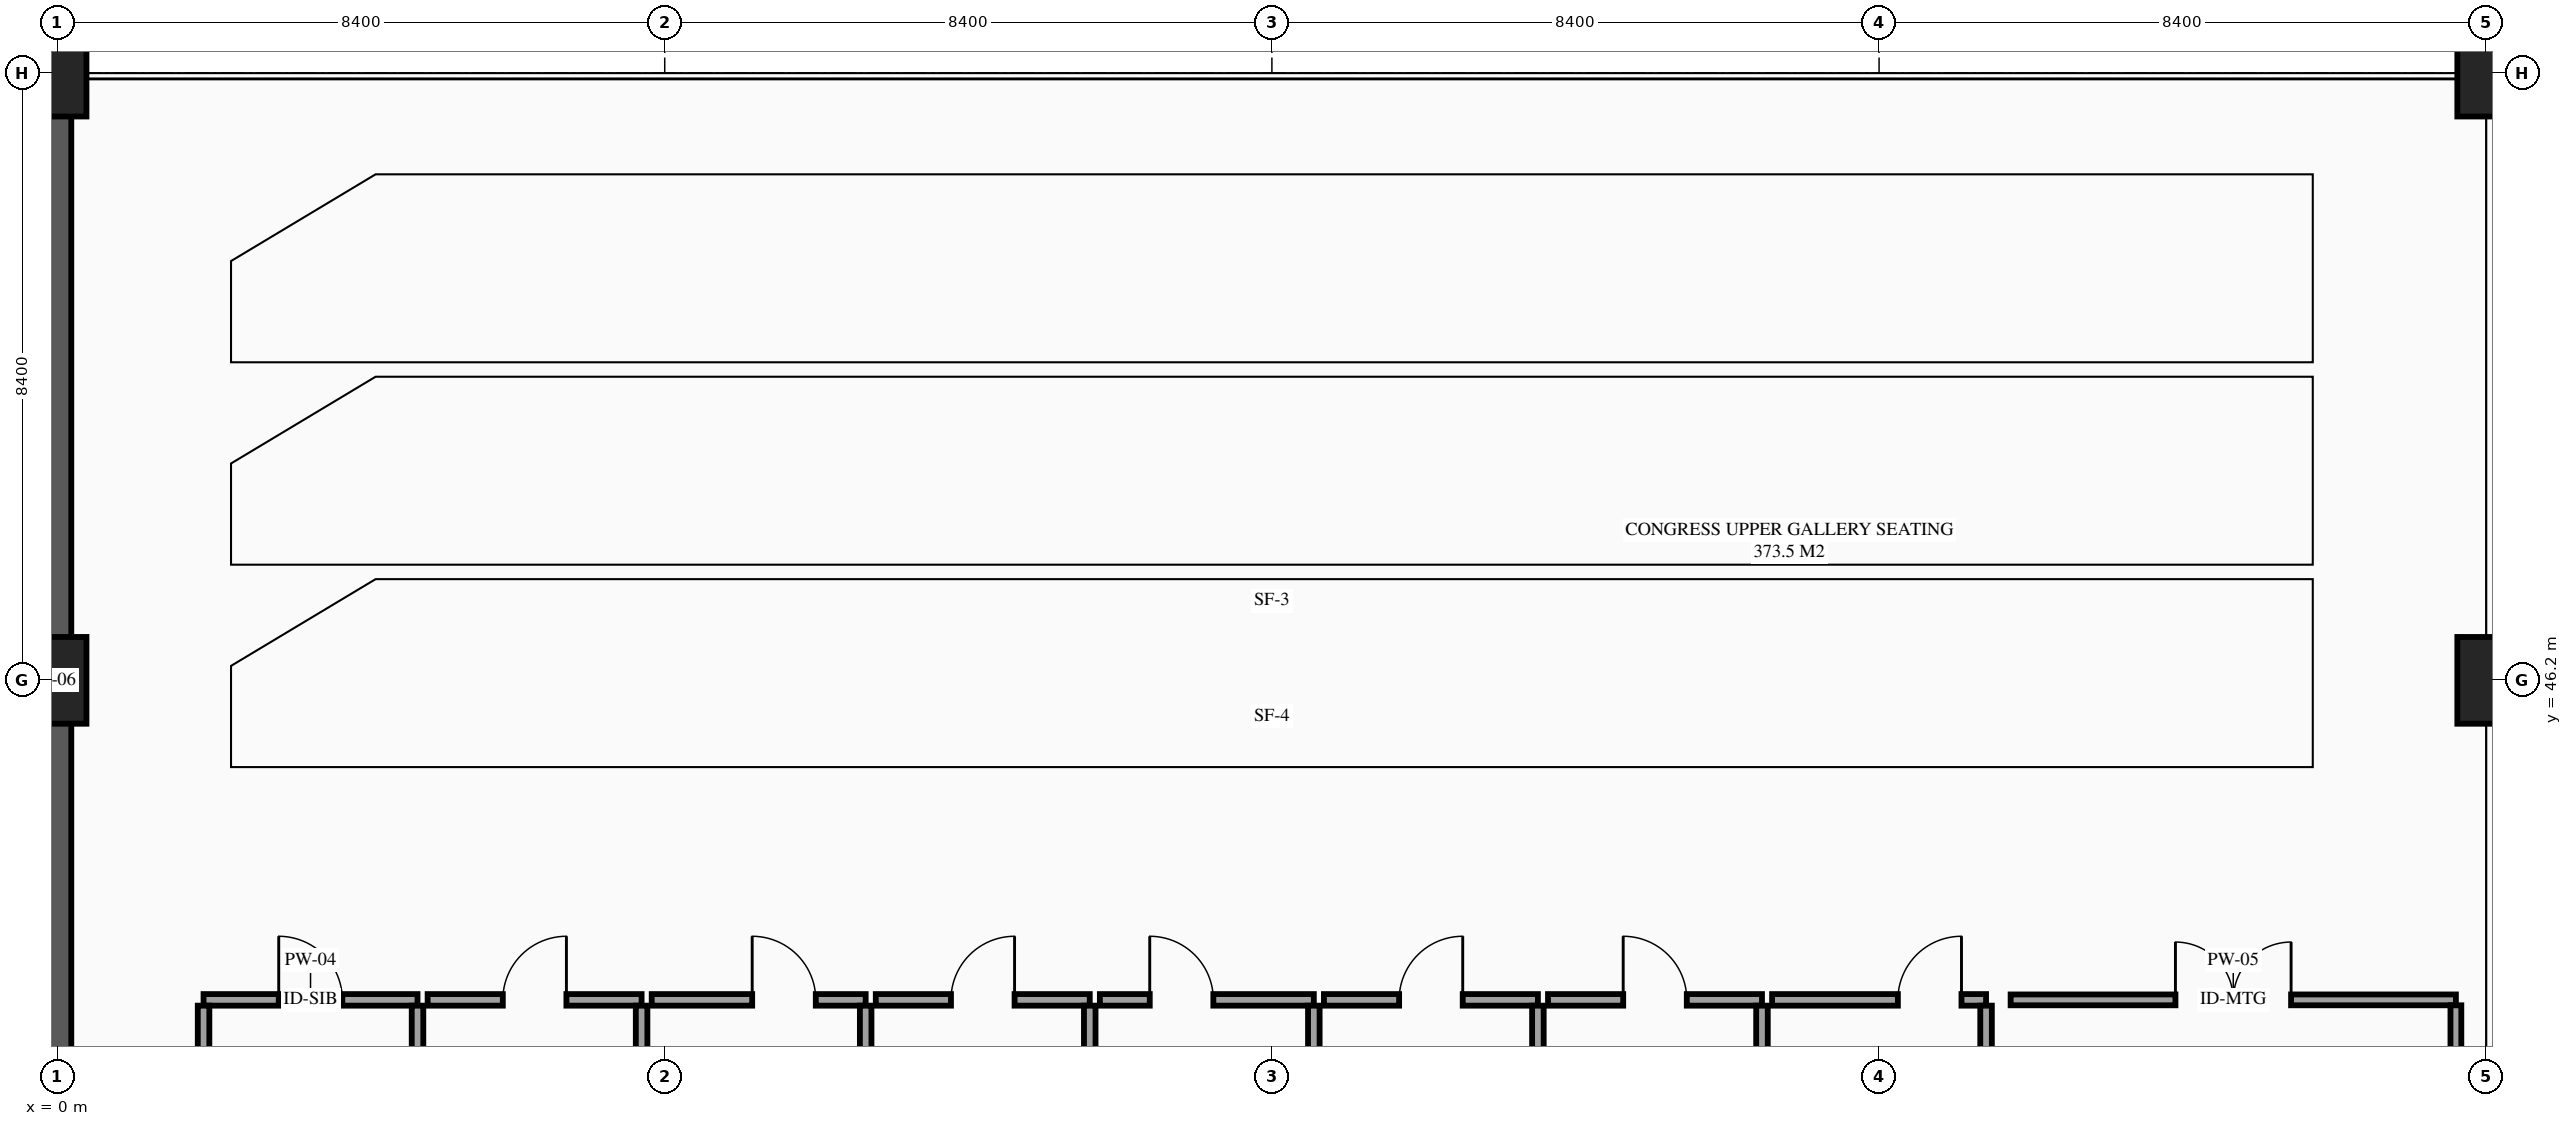
"""IFC4 building model, lengths in metres.
Left out: names, types, materials, properties, quantities, classifications, styles, units other than length and angle.
Written with IfcOpenShell. Run it as: python <this file> out.ifc"""

import sys

from ifc_helpers import new_model, si_unit, direction, frame, frame_2d, origin, origin_2d, place, context, subcontext, project, spatial, rectangle, extrude, element, fill, save


model = new_model("IFC4")
c1 = context("Model", 3, precision=1e-05, world=origin(), true_north=direction((0.0, 1.0)))
c2 = subcontext(c1, "Body", "Model", "MODEL_VIEW")
j1 = project(units=[si_unit("LENGTHUNIT", "METRE"), si_unit("PLANEANGLEUNIT", "RADIAN")], contexts=[c1])
p1 = place(None, origin())
s1 = spatial("IfcSite", under=j1, at=p1, CompositionType="ELEMENT")
p2 = place(p1, origin())
s2 = spatial("IfcBuilding", under=s1, at=p2, CompositionType="ELEMENT")
p3 = place(p2, frame((0.0, 0.0, 5.4)))
s3 = spatial("IfcBuildingStorey", under=s2, at=p3, CompositionType="ELEMENT", Elevation=5.4)
for number, where, z_axis, x_axis in (
    (1, (0.0, 46.2, 0.0), (0.0, 0.0, 1.0), (1.0, 0.0, 0.0)),
    (2, (0.0, 54.6, 0.0), (0.0, 0.0, 1.0), (1.0, 0.0, 0.0)),
    (3, (33.6, 46.2, 0.0), (0.0, 0.0, 1.0), (1.0, 0.0, 0.0)),
    (4, (33.6, 54.6, 0.0), (0.0, 0.0, 1.0), (1.0, 0.0, 0.0)),
):
    element("IfcColumn", number, at=place(p3, frame(where, z_axis=z_axis, x_axis=x_axis)), inside=s3, PredefinedType="COLUMN", context=c2, shape_type="SweptSolid", body=[
        extrude(rectangle(XDim=0.8, YDim=1.2, at=origin_2d()), origin(), (0.0, 0.0, 1.0), 4.5),
    ])
p4 = place(p3, frame((0.0, 63.0, 0.0), z_axis=(0.0, 0.0, 1.0), x_axis=(0.0, -1.0, 0.0)))
e5 = element("IfcWall", 5, at=p4, inside=s3, PredefinedType="STANDARD", context=c2, shape_type="SweptSolid", body=[
    extrude(rectangle(XDim=8.4, YDim=0.38, at=frame_2d((4.2, 0.0))), origin(), (0.0, 0.0, 1.0), 4.5),
])
p5 = place(p3, frame((0.0, 54.6, 0.0), z_axis=(0.0, 0.0, 1.0), x_axis=(0.0, -1.0, 0.0)))
e6 = element("IfcWall", 6, at=p5, inside=s3, PredefinedType="STANDARD", context=c2, shape_type="SweptSolid", body=[
    extrude(rectangle(XDim=8.4, YDim=0.38, at=frame_2d((4.2, 0.0))), origin(), (0.0, 0.0, 1.0), 4.5),
])
p6 = place(p3, frame((0.0, 46.2, 0.0), z_axis=(0.0, 0.0, 1.0), x_axis=(0.0, -1.0, 0.0)))
e7 = element("IfcWall", 7, at=p6, inside=s3, PredefinedType="STANDARD", context=c2, shape_type="SweptSolid", body=[
    extrude(rectangle(XDim=8.4, YDim=0.38, at=frame_2d((4.2, 0.0))), origin(), (0.0, 0.0, 1.0), 4.5),
])
p7 = place(p3, frame((2.02, 41.78, 0.0), z_axis=(0.0, 0.0, 1.0), x_axis=(1.0, 0.0, 0.0)))
e8 = element("IfcWall", 8, at=p7, inside=s3, PredefinedType="PARTITIONING", context=c2, shape_type="SweptSolid", body=[
    extrude(rectangle(XDim=2.96, YDim=0.16, at=frame_2d((1.48, 0.0))), origin(), (0.0, 0.0, 1.0), 4.235),
])
p8 = place(p7, frame((1.04, 0.0, 0.0)))
e9 = element("IfcOpeningElement", 9, at=p8, cuts=e8, PredefinedType="OPENING", context=c2, shape_type="SweptSolid", body=[
    extrude(rectangle(XDim=0.88, YDim=2.05, at=frame_2d((0.44, 1.025))), frame((0.0, 0.09, 0.0), z_axis=(0.0, -1.0, 0.0), x_axis=(1.0, 0.0, 0.0)), (0.0, 0.0, 1.0), 0.18),
])
for number, where, z_axis, x_axis in (
    (10, (2.02, 37.99, 0.0), (0.0, 0.0, 1.0), (0.0, 1.0, 0.0)),
    (11, (4.98, 37.99, 0.0), (0.0, 0.0, 1.0), (0.0, 1.0, 0.0)),
):
    element("IfcWall", number, at=place(p3, frame(where, z_axis=z_axis, x_axis=x_axis)), inside=s3, PredefinedType="PARTITIONING", context=c2, shape_type="SweptSolid", body=[
        extrude(rectangle(XDim=3.71, YDim=0.16, at=frame_2d((1.855, 0.0))), origin(), (0.0, 0.0, 1.0), 4.235),
    ])
p9 = place(p3, frame((5.12, 41.78, 0.0), z_axis=(0.0, 0.0, 1.0), x_axis=(1.0, 0.0, 0.0)))
e12 = element("IfcWall", 12, at=p9, inside=s3, PredefinedType="PARTITIONING", context=c2, shape_type="SweptSolid", body=[
    extrude(rectangle(XDim=2.96, YDim=0.16, at=frame_2d((1.48, 0.0))), origin(), (0.0, 0.0, 1.0), 4.235),
])
p10 = place(p9, frame((1.04, 0.0, 0.0)))
e13 = element("IfcOpeningElement", 13, at=p10, cuts=e12, PredefinedType="OPENING", context=c2, shape_type="SweptSolid", body=[
    extrude(rectangle(XDim=0.88, YDim=2.05, at=frame_2d((0.44, 1.025))), frame((0.0, 0.09, 0.0), z_axis=(0.0, -1.0, 0.0), x_axis=(1.0, 0.0, 0.0)), (0.0, 0.0, 1.0), 0.18),
])
p11 = place(p3, frame((8.08, 37.99, 0.0), z_axis=(0.0, 0.0, 1.0), x_axis=(0.0, 1.0, 0.0)))
e14 = element("IfcWall", 14, at=p11, inside=s3, PredefinedType="PARTITIONING", context=c2, shape_type="SweptSolid", body=[
    extrude(rectangle(XDim=3.71, YDim=0.16, at=frame_2d((1.855, 0.0))), origin(), (0.0, 0.0, 1.0), 4.235),
])
p12 = place(p3, frame((8.22, 41.78, 0.0), z_axis=(0.0, 0.0, 1.0), x_axis=(1.0, 0.0, 0.0)))
e15 = element("IfcWall", 15, at=p12, inside=s3, PredefinedType="PARTITIONING", context=c2, shape_type="SweptSolid", body=[
    extrude(rectangle(XDim=2.96, YDim=0.16, at=frame_2d((1.48, 0.0))), origin(), (0.0, 0.0, 1.0), 4.235),
])
p13 = place(p12, frame((1.39, 0.0, 0.0)))
e16 = element("IfcOpeningElement", 16, at=p13, cuts=e15, PredefinedType="OPENING", context=c2, shape_type="SweptSolid", body=[
    extrude(rectangle(XDim=0.88, YDim=2.05, at=frame_2d((0.44, 1.025))), frame((0.0, 0.09, 0.0), z_axis=(0.0, -1.0, 0.0), x_axis=(1.0, 0.0, 0.0)), (0.0, 0.0, 1.0), 0.18),
])
p14 = place(p3, frame((11.18, 37.99, 0.0), z_axis=(0.0, 0.0, 1.0), x_axis=(0.0, 1.0, 0.0)))
e17 = element("IfcWall", 17, at=p14, inside=s3, PredefinedType="PARTITIONING", context=c2, shape_type="SweptSolid", body=[
    extrude(rectangle(XDim=3.71, YDim=0.16, at=frame_2d((1.855, 0.0))), origin(), (0.0, 0.0, 1.0), 4.235),
])
p15 = place(p3, frame((11.32, 41.78, 0.0), z_axis=(0.0, 0.0, 1.0), x_axis=(1.0, 0.0, 0.0)))
e18 = element("IfcWall", 18, at=p15, inside=s3, PredefinedType="PARTITIONING", context=c2, shape_type="SweptSolid", body=[
    extrude(rectangle(XDim=2.96, YDim=0.16, at=frame_2d((1.48, 0.0))), origin(), (0.0, 0.0, 1.0), 4.235),
])
p16 = place(p15, frame((1.04, 0.0, 0.0)))
e19 = element("IfcOpeningElement", 19, at=p16, cuts=e18, PredefinedType="OPENING", context=c2, shape_type="SweptSolid", body=[
    extrude(rectangle(XDim=0.88, YDim=2.05, at=frame_2d((0.44, 1.025))), frame((0.0, 0.09, 0.0), z_axis=(0.0, -1.0, 0.0), x_axis=(1.0, 0.0, 0.0)), (0.0, 0.0, 1.0), 0.18),
])
p17 = place(p3, frame((14.28, 37.99, 0.0), z_axis=(0.0, 0.0, 1.0), x_axis=(0.0, 1.0, 0.0)))
e20 = element("IfcWall", 20, at=p17, inside=s3, PredefinedType="PARTITIONING", context=c2, shape_type="SweptSolid", body=[
    extrude(rectangle(XDim=3.71, YDim=0.16, at=frame_2d((1.855, 0.0))), origin(), (0.0, 0.0, 1.0), 4.235),
])
p18 = place(p3, frame((14.42, 41.78, 0.0), z_axis=(0.0, 0.0, 1.0), x_axis=(1.0, 0.0, 0.0)))
e21 = element("IfcWall", 21, at=p18, inside=s3, PredefinedType="PARTITIONING", context=c2, shape_type="SweptSolid", body=[
    extrude(rectangle(XDim=2.96, YDim=0.16, at=frame_2d((1.48, 0.0))), origin(), (0.0, 0.0, 1.0), 4.235),
])
p19 = place(p18, frame((0.69, 0.0, 0.0)))
e22 = element("IfcOpeningElement", 22, at=p19, cuts=e21, PredefinedType="OPENING", context=c2, shape_type="SweptSolid", body=[
    extrude(rectangle(XDim=0.88, YDim=2.05, at=frame_2d((0.44, 1.025))), frame((0.0, 0.09, 0.0), z_axis=(0.0, -1.0, 0.0), x_axis=(1.0, 0.0, 0.0)), (0.0, 0.0, 1.0), 0.18),
])
p20 = place(p3, frame((17.38, 38.82, 0.0), z_axis=(0.0, 0.0, 1.0), x_axis=(0.0, 1.0, 0.0)))
e23 = element("IfcWall", 23, at=p20, inside=s3, PredefinedType="PARTITIONING", context=c2, shape_type="SweptSolid", body=[
    extrude(rectangle(XDim=2.88, YDim=0.16, at=frame_2d((1.44, 0.0))), origin(), (0.0, 0.0, 1.0), 4.235),
])
p21 = place(p3, frame((17.52, 41.78, 0.0), z_axis=(0.0, 0.0, 1.0), x_axis=(1.0, 0.0, 0.0)))
e24 = element("IfcWall", 24, at=p21, inside=s3, PredefinedType="PARTITIONING", context=c2, shape_type="SweptSolid", body=[
    extrude(rectangle(XDim=2.96, YDim=0.16, at=frame_2d((1.48, 0.0))), origin(), (0.0, 0.0, 1.0), 4.235),
])
p22 = place(p21, frame((1.04, 0.0, 0.0)))
e25 = element("IfcOpeningElement", 25, at=p22, cuts=e24, PredefinedType="OPENING", context=c2, shape_type="SweptSolid", body=[
    extrude(rectangle(XDim=0.88, YDim=2.05, at=frame_2d((0.44, 1.025))), frame((0.0, 0.09, 0.0), z_axis=(0.0, -1.0, 0.0), x_axis=(1.0, 0.0, 0.0)), (0.0, 0.0, 1.0), 0.18),
])
p23 = place(p3, frame((20.48, 38.82, 0.0), z_axis=(0.0, 0.0, 1.0), x_axis=(0.0, 1.0, 0.0)))
e26 = element("IfcWall", 26, at=p23, inside=s3, PredefinedType="PARTITIONING", context=c2, shape_type="SweptSolid", body=[
    extrude(rectangle(XDim=2.88, YDim=0.16, at=frame_2d((1.44, 0.0))), origin(), (0.0, 0.0, 1.0), 4.235),
])
p24 = place(p3, frame((20.62, 41.78, 0.0), z_axis=(0.0, 0.0, 1.0), x_axis=(1.0, 0.0, 0.0)))
e27 = element("IfcWall", 27, at=p24, inside=s3, PredefinedType="PARTITIONING", context=c2, shape_type="SweptSolid", body=[
    extrude(rectangle(XDim=2.96, YDim=0.16, at=frame_2d((1.48, 0.0))), origin(), (0.0, 0.0, 1.0), 4.235),
])
p25 = place(p24, frame((1.04, 0.0, 0.0)))
e28 = element("IfcOpeningElement", 28, at=p25, cuts=e27, PredefinedType="OPENING", context=c2, shape_type="SweptSolid", body=[
    extrude(rectangle(XDim=0.88, YDim=2.05, at=frame_2d((0.44, 1.025))), frame((0.0, 0.09, 0.0), z_axis=(0.0, -1.0, 0.0), x_axis=(1.0, 0.0, 0.0)), (0.0, 0.0, 1.0), 0.18),
])
p26 = place(p3, frame((23.58, 38.82, 0.0), z_axis=(0.0, 0.0, 1.0), x_axis=(0.0, 1.0, 0.0)))
e29 = element("IfcWall", 29, at=p26, inside=s3, PredefinedType="PARTITIONING", context=c2, shape_type="SweptSolid", body=[
    extrude(rectangle(XDim=2.88, YDim=0.16, at=frame_2d((1.44, 0.0))), origin(), (0.0, 0.0, 1.0), 4.235),
])
p27 = place(p3, frame((23.72, 41.78, 0.0), z_axis=(0.0, 0.0, 1.0), x_axis=(1.0, 0.0, 0.0)))
e30 = element("IfcWall", 30, at=p27, inside=s3, PredefinedType="PARTITIONING", context=c2, shape_type="SweptSolid", body=[
    extrude(rectangle(XDim=2.96, YDim=0.16, at=frame_2d((1.48, 0.0))), origin(), (0.0, 0.0, 1.0), 4.235),
])
p28 = place(p27, frame((1.74, 0.0, 0.0)))
e31 = element("IfcOpeningElement", 31, at=p28, cuts=e30, PredefinedType="OPENING", context=c2, shape_type="SweptSolid", body=[
    extrude(rectangle(XDim=0.88, YDim=2.05, at=frame_2d((0.44, 1.025))), frame((0.0, 0.09, 0.0), z_axis=(0.0, -1.0, 0.0), x_axis=(1.0, 0.0, 0.0)), (0.0, 0.0, 1.0), 0.18),
])
p29 = place(p3, frame((26.68, 38.82, 0.0), z_axis=(0.0, 0.0, 1.0), x_axis=(0.0, 1.0, 0.0)))
e32 = element("IfcWall", 32, at=p29, inside=s3, PredefinedType="PARTITIONING", context=c2, shape_type="SweptSolid", body=[
    extrude(rectangle(XDim=2.88, YDim=0.16, at=frame_2d((1.44, 0.0))), origin(), (0.0, 0.0, 1.0), 4.235),
])
p30 = place(p3, frame((27.02, 41.78, 0.0), z_axis=(0.0, 0.0, 1.0), x_axis=(1.0, 0.0, 0.0)))
e33 = element("IfcWall", 33, at=p30, inside=s3, PredefinedType="PARTITIONING", context=c2, shape_type="SweptSolid", body=[
    extrude(rectangle(XDim=6.16, YDim=0.15, at=frame_2d((3.08, 0.0))), origin(), (0.0, 0.0, 1.0), 4.235),
])
p31 = place(p30, frame((2.28, 0.0, 0.0)))
e34 = element("IfcOpeningElement", 34, at=p31, cuts=e33, PredefinedType="OPENING", context=c2, shape_type="SweptSolid", body=[
    extrude(rectangle(XDim=1.6, YDim=2.25, at=frame_2d((0.8, 1.125))), frame((0.0, 0.085, 0.0), z_axis=(0.0, -1.0, 0.0), x_axis=(1.0, 0.0, 0.0)), (0.0, 0.0, 1.0), 0.17),
])
p32 = place(p3, frame((33.18, 38.82, 0.0), z_axis=(0.0, 0.0, 1.0), x_axis=(0.0, 1.0, 0.0)))
e35 = element("IfcWall", 35, at=p32, inside=s3, PredefinedType="PARTITIONING", context=c2, shape_type="SweptSolid", body=[
    extrude(rectangle(XDim=2.885, YDim=0.15, at=frame_2d((1.442, 0.0))), origin(), (0.0, 0.0, 1.0), 4.235),
])
p33 = place(p8, origin())
e36 = element("IfcDoor", 36, at=p33, inside=s3, OperationType="SINGLE_SWING_LEFT", PredefinedType="DOOR", context=c2, shape_type="SweptSolid", body=[
    extrude(rectangle(XDim=0.88, YDim=2.05, at=frame_2d((0.44, 1.025))), frame((0.0, 0.025, 0.0), z_axis=(0.0, -1.0, 0.0), x_axis=(1.0, 0.0, 0.0)), (0.0, 0.0, 1.0), 0.05),
])
fill(e9, e36)
p34 = place(p10, origin())
e37 = element("IfcDoor", 37, at=p34, inside=s3, OperationType="SINGLE_SWING_RIGHT", PredefinedType="DOOR", context=c2, shape_type="SweptSolid", body=[
    extrude(rectangle(XDim=0.88, YDim=2.05, at=frame_2d((0.44, 1.025))), frame((0.0, 0.025, 0.0), z_axis=(0.0, -1.0, 0.0), x_axis=(1.0, 0.0, 0.0)), (0.0, 0.0, 1.0), 0.05),
])
fill(e13, e37)
p35 = place(p13, origin())
e38 = element("IfcDoor", 38, at=p35, inside=s3, OperationType="SINGLE_SWING_LEFT", PredefinedType="DOOR", context=c2, shape_type="SweptSolid", body=[
    extrude(rectangle(XDim=0.88, YDim=2.05, at=frame_2d((0.44, 1.025))), frame((0.0, 0.025, 0.0), z_axis=(0.0, -1.0, 0.0), x_axis=(1.0, 0.0, 0.0)), (0.0, 0.0, 1.0), 0.05),
])
fill(e16, e38)
p36 = place(p16, origin())
e39 = element("IfcDoor", 39, at=p36, inside=s3, OperationType="SINGLE_SWING_RIGHT", PredefinedType="DOOR", context=c2, shape_type="SweptSolid", body=[
    extrude(rectangle(XDim=0.88, YDim=2.05, at=frame_2d((0.44, 1.025))), frame((0.0, 0.025, 0.0), z_axis=(0.0, -1.0, 0.0), x_axis=(1.0, 0.0, 0.0)), (0.0, 0.0, 1.0), 0.05),
])
fill(e19, e39)
p37 = place(p19, origin())
e40 = element("IfcDoor", 40, at=p37, inside=s3, OperationType="SINGLE_SWING_LEFT", PredefinedType="DOOR", context=c2, shape_type="SweptSolid", body=[
    extrude(rectangle(XDim=0.88, YDim=2.05, at=frame_2d((0.44, 1.025))), frame((0.0, 0.025, 0.0), z_axis=(0.0, -1.0, 0.0), x_axis=(1.0, 0.0, 0.0)), (0.0, 0.0, 1.0), 0.05),
])
fill(e22, e40)
p38 = place(p22, origin())
e41 = element("IfcDoor", 41, at=p38, inside=s3, OperationType="SINGLE_SWING_RIGHT", PredefinedType="DOOR", context=c2, shape_type="SweptSolid", body=[
    extrude(rectangle(XDim=0.88, YDim=2.05, at=frame_2d((0.44, 1.025))), frame((0.0, 0.025, 0.0), z_axis=(0.0, -1.0, 0.0), x_axis=(1.0, 0.0, 0.0)), (0.0, 0.0, 1.0), 0.05),
])
fill(e25, e41)
p39 = place(p25, origin())
e42 = element("IfcDoor", 42, at=p39, inside=s3, OperationType="SINGLE_SWING_LEFT", PredefinedType="DOOR", context=c2, shape_type="SweptSolid", body=[
    extrude(rectangle(XDim=0.88, YDim=2.05, at=frame_2d((0.44, 1.025))), frame((0.0, 0.025, 0.0), z_axis=(0.0, -1.0, 0.0), x_axis=(1.0, 0.0, 0.0)), (0.0, 0.0, 1.0), 0.05),
])
fill(e28, e42)
p40 = place(p28, origin())
e43 = element("IfcDoor", 43, at=p40, inside=s3, OperationType="SINGLE_SWING_RIGHT", PredefinedType="DOOR", context=c2, shape_type="SweptSolid", body=[
    extrude(rectangle(XDim=0.88, YDim=2.05, at=frame_2d((0.44, 1.025))), frame((0.0, 0.025, 0.0), z_axis=(0.0, -1.0, 0.0), x_axis=(1.0, 0.0, 0.0)), (0.0, 0.0, 1.0), 0.05),
])
fill(e31, e43)
p41 = place(p31, origin())
e44 = element("IfcDoor", 44, at=p41, inside=s3, OperationType="DOUBLE_DOOR_SINGLE_SWING", PredefinedType="DOOR", context=c2, shape_type="SweptSolid", body=[
    extrude(rectangle(XDim=1.6, YDim=2.25, at=frame_2d((0.8, 1.125))), frame((0.0, 0.025, 0.0), z_axis=(0.0, -1.0, 0.0), x_axis=(1.0, 0.0, 0.0)), (0.0, 0.0, 1.0), 0.05),
])
fill(e34, e44)
save(model, sys.argv[1])
